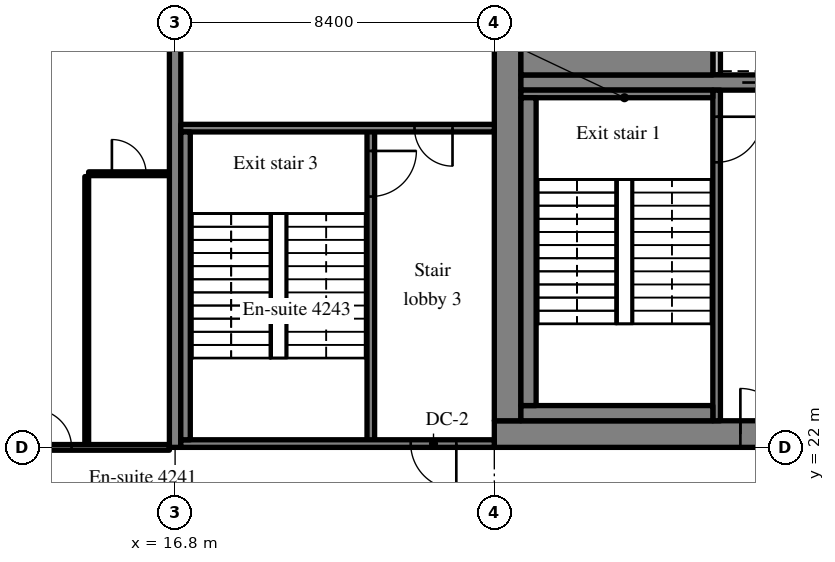
"""IFC4 building model, lengths in metres.
Left out: names, types, materials, properties, quantities, classifications, styles, units other than length and angle.
Written with IfcOpenShell. Run it as: python <this file> out.ifc"""

import sys

from ifc_helpers import new_model, si_unit, direction, frame, frame_2d, origin, place, context, subcontext, project, spatial, rectangle, extrude, source, transform, mapped, element, fill, save


model = new_model("IFC4")
c1 = context("Model", 3, precision=1e-05, world=origin(), true_north=direction((0.0, 1.0)))
c2 = subcontext(c1, "Body", "Model", "MODEL_VIEW")
j1 = project(units=[si_unit("LENGTHUNIT", "METRE"), si_unit("PLANEANGLEUNIT", "RADIAN")], contexts=[c1])
p1 = place(None, origin())
s1 = spatial("IfcSite", under=j1, at=p1, CompositionType="ELEMENT")
p2 = place(p1, origin())
s2 = spatial("IfcBuilding", under=s1, at=p2, CompositionType="ELEMENT")
p3 = place(p2, frame((0.0, 0.0, 174.4)))
s3 = spatial("IfcBuildingStorey", under=s2, at=p3, CompositionType="ELEMENT", Elevation=174.4)
m1 = source(origin(), c2, "Body", "SweptSolid", [
    extrude(rectangle(XDim=50.4, YDim=0.7, at=frame_2d((25.2, 0.0))), origin(), (0.0, 0.0, 1.0), 3.52),
])
p4 = place(p3, frame((25.2, 22.35, 0.0), z_axis=(0.0, 0.0, 1.0), x_axis=(1.0, 0.0, 0.0)))
e1 = element("IfcWall", 1, at=p4, inside=s3, PredefinedType="SHEAR", context=c2, shape_type="MappedRepresentation", body=[
    mapped(m1, transform((0.0, 0.0, 0.0), scale=1.0)),
])
m2 = source(origin(), c2, "Body", "SweptSolid", [
    extrude(rectangle(XDim=1.8, YDim=2.1, at=frame_2d((0.9, 1.05))), frame((0.0, 0.36, 0.0), z_axis=(0.0, -1.0, 0.0), x_axis=(1.0, 0.0, 0.0)), (0.0, 0.0, 1.0), 0.72),
])
p5 = place(p4, frame((15.9, 0.0, 0.0)))
e2 = element("IfcOpeningElement", 2, at=p5, cuts=e1, PredefinedType="OPENING", context=c2, shape_type="MappedRepresentation", body=[
    mapped(m2, transform((0.0, 0.0, 0.0), scale=1.0)),
])
m3 = source(origin(), c2, "Body", "SweptSolid", [
    extrude(rectangle(XDim=0.9, YDim=2.1, at=frame_2d((0.45, 1.05))), frame((0.0, 0.36, 0.0), z_axis=(0.0, -1.0, 0.0), x_axis=(1.0, 0.0, 0.0)), (0.0, 0.0, 1.0), 0.72),
])
p6 = place(p4, frame((11.2, 0.0, 0.0)))
e3 = element("IfcOpeningElement", 3, at=p6, cuts=e1, PredefinedType="OPENING", context=c2, shape_type="MappedRepresentation", body=[
    mapped(m3, transform((0.0, 0.0, 0.0), scale=1.0)),
])
p7 = place(p4, frame((21.5, 0.0, 0.0)))
e4 = element("IfcOpeningElement", 4, at=p7, cuts=e1, PredefinedType="OPENING", context=c2, shape_type="MappedRepresentation", body=[
    mapped(m3, transform((0.0, 0.0, 0.0), scale=1.0)),
])
p8 = place(p4, frame((32.7, 0.0, 0.0)))
e5 = element("IfcOpeningElement", 5, at=p8, cuts=e1, PredefinedType="OPENING", context=c2, shape_type="MappedRepresentation", body=[
    mapped(m2, transform((0.0, 0.0, 0.0), scale=1.0)),
])
m4 = source(origin(), c2, "Body", "SweptSolid", [
    extrude(rectangle(XDim=1.2, YDim=2.1, at=frame_2d((0.6, 1.05))), frame((0.0, 0.36, 0.0), z_axis=(0.0, -1.0, 0.0), x_axis=(1.0, 0.0, 0.0)), (0.0, 0.0, 1.0), 0.72),
])
p9 = place(p4, frame((6.475, 0.0, 0.0)))
e6 = element("IfcOpeningElement", 6, at=p9, cuts=e1, PredefinedType="OPENING", context=c2, shape_type="MappedRepresentation", body=[
    mapped(m4, transform((0.0, 0.0, 0.0), scale=1.0)),
])
p10 = place(p4, frame((47.875, 0.0, 0.0)))
e7 = element("IfcOpeningElement", 7, at=p10, cuts=e1, PredefinedType="OPENING", context=c2, shape_type="MappedRepresentation", body=[
    mapped(m4, transform((0.0, 0.0, 0.0), scale=1.0)),
])
m5 = source(origin(), c2, "Body", "SweptSolid", [
    extrude(rectangle(XDim=18.6, YDim=0.7, at=frame_2d((9.3, 0.0))), origin(), (0.0, 0.0, 1.0), 3.52),
])
p11 = place(p3, frame((25.55, 22.7, 0.0), z_axis=(0.0, 0.0, 1.0), x_axis=(0.0, 1.0, 0.0)))
e8 = element("IfcWall", 8, at=p11, inside=s3, PredefinedType="SHEAR", context=c2, shape_type="MappedRepresentation", body=[
    mapped(m5, transform((0.0, 0.0, 0.0), scale=1.0)),
])
m6 = source(origin(), c2, "Body", "SweptSolid", [
    extrude(rectangle(XDim=7.5, YDim=0.4, at=frame_2d((3.75, 0.0))), origin(), (0.0, 0.0, 1.0), 3.52),
])
p12 = place(p3, frame((25.9, 31.6, 0.0), z_axis=(0.0, 0.0, 1.0), x_axis=(1.0, 0.0, 0.0)))
e9 = element("IfcWall", 9, at=p12, inside=s3, PredefinedType="SHEAR", context=c2, shape_type="MappedRepresentation", body=[
    mapped(m6, transform((0.0, 0.0, 0.0), scale=1.0)),
])
m7 = source(origin(), c2, "Body", "SweptSolid", [
    extrude(rectangle(XDim=1.1, YDim=2.1, at=frame_2d((0.55, 1.05))), frame((0.0, 0.21, 0.0), z_axis=(0.0, -1.0, 0.0), x_axis=(1.0, 0.0, 0.0)), (0.0, 0.0, 1.0), 0.42),
])
p13 = place(p12, frame((5.825, 0.0, 0.0)))
e10 = element("IfcOpeningElement", 10, at=p13, cuts=e9, PredefinedType="OPENING", context=c2, shape_type="MappedRepresentation", body=[
    mapped(m7, transform((0.0, 0.0, 0.0), scale=1.0)),
])
m8 = source(origin(), c2, "Body", "SweptSolid", [
    extrude(rectangle(XDim=20.0, YDim=0.3, at=frame_2d((10.0, 0.0))), origin(), (0.0, 0.0, 1.0), 3.52),
])
p14 = place(p3, frame((16.8, 22.0, 0.0), z_axis=(0.0, 0.0, 1.0), x_axis=(0.0, 1.0, 0.0)))
e11 = element("IfcWall", 11, at=p14, inside=s3, PredefinedType="SHEAR", context=c2, shape_type="MappedRepresentation", body=[
    mapped(m8, transform((0.0, 0.0, 0.0), scale=1.0)),
])
m9 = source(origin(), c2, "Body", "SweptSolid", [
    extrude(rectangle(XDim=8.7, YDim=0.2, at=frame_2d((4.35, 0.0))), origin(), (0.0, 0.0, 1.0), 3.52),
])
p15 = place(p3, frame((31.05, 22.7, 0.0), z_axis=(0.0, 0.0, 1.0), x_axis=(0.0, 1.0, 0.0)))
e12 = element("IfcWall", 12, at=p15, inside=s3, PredefinedType="SOLIDWALL", context=c2, shape_type="MappedRepresentation", body=[
    mapped(m9, transform((0.0, 0.0, 0.0), scale=1.0)),
])
m10 = source(origin(), c2, "Body", "SweptSolid", [
    extrude(rectangle(XDim=1.2, YDim=2.1, at=frame_2d((0.6, 1.05))), frame((0.0, 0.11, 0.0), z_axis=(0.0, -1.0, 0.0), x_axis=(1.0, 0.0, 0.0)), (0.0, 0.0, 1.0), 0.22),
])
p16 = place(p15, frame((6.8, 0.0, 0.0)))
e13 = element("IfcOpeningElement", 13, at=p16, cuts=e12, PredefinedType="OPENING", context=c2, shape_type="MappedRepresentation", body=[
    mapped(m10, transform((0.0, 0.0, 0.0), scale=1.0)),
])
m11 = source(origin(), c2, "Body", "SweptSolid", [
    extrude(rectangle(XDim=1.8, YDim=0.2, at=frame_2d((0.9, 0.0))), origin(), (0.0, 0.0, 1.0), 3.52),
])
p17 = place(p3, frame((31.05, 31.8, 0.0), z_axis=(0.0, 0.0, 1.0), x_axis=(0.0, 1.0, 0.0)))
e14 = element("IfcWall", 14, at=p17, inside=s3, PredefinedType="SOLIDWALL", context=c2, shape_type="MappedRepresentation", body=[
    mapped(m11, transform((0.0, 0.0, 0.0), scale=1.0)),
])
m12 = source(origin(), c2, "Body", "SweptSolid", [
    extrude(rectangle(XDim=8.3, YDim=0.2, at=frame_2d((4.15, 0.0))), origin(), (0.0, 0.0, 1.0), 3.52),
])
p18 = place(p3, frame((21.95, 22.1, 0.0), z_axis=(0.0, 0.0, 1.0), x_axis=(0.0, 1.0, 0.0)))
e15 = element("IfcWall", 15, at=p18, inside=s3, PredefinedType="SOLIDWALL", context=c2, shape_type="MappedRepresentation", body=[
    mapped(m12, transform((0.0, 0.0, 0.0), scale=1.0)),
])
p19 = place(p18, frame((6.5, 0.0, 0.0)))
e16 = element("IfcOpeningElement", 16, at=p19, cuts=e15, PredefinedType="OPENING", context=c2, shape_type="MappedRepresentation", body=[
    mapped(m10, transform((0.0, 0.0, 0.0), scale=1.0)),
])
m13 = source(origin(), c2, "Body", "SweptSolid", [
    extrude(rectangle(XDim=8.25, YDim=0.2, at=frame_2d((4.125, 0.0))), origin(), (0.0, 0.0, 1.0), 3.52),
])
p20 = place(p3, frame((16.95, 22.1, 0.0), z_axis=(0.0, 0.0, 1.0), x_axis=(1.0, 0.0, 0.0)))
e17 = element("IfcWall", 17, at=p20, inside=s3, PredefinedType="SOLIDWALL", context=c2, shape_type="MappedRepresentation", body=[
    mapped(m13, transform((0.0, 0.0, 0.0), scale=1.0)),
])
p21 = place(p20, frame((6.05, 0.0, 0.0)))
e18 = element("IfcOpeningElement", 18, at=p21, cuts=e17, PredefinedType="OPENING", context=c2, shape_type="MappedRepresentation", body=[
    mapped(m10, transform((0.0, 0.0, 0.0), scale=1.0)),
])
p22 = place(p3, frame((16.95, 30.4, 0.0), z_axis=(0.0, 0.0, 1.0), x_axis=(1.0, 0.0, 0.0)))
e19 = element("IfcWall", 19, at=p22, inside=s3, PredefinedType="SOLIDWALL", context=c2, shape_type="MappedRepresentation", body=[
    mapped(m13, transform((0.0, 0.0, 0.0), scale=1.0)),
])
m14 = source(origin(), c2, "Body", "SweptSolid", [
    extrude(rectangle(XDim=1.0, YDim=2.1, at=frame_2d((0.5, 1.05))), frame((0.0, 0.11, 0.0), z_axis=(0.0, -1.0, 0.0), x_axis=(1.0, 0.0, 0.0)), (0.0, 0.0, 1.0), 0.22),
])
p23 = place(p22, frame((6.15, 0.0, 0.0)))
e20 = element("IfcOpeningElement", 20, at=p23, cuts=e19, PredefinedType="OPENING", context=c2, shape_type="MappedRepresentation", body=[
    mapped(m14, transform((0.0, 0.0, 0.0), scale=1.0)),
])
m15 = source(origin(), c2, "Body", "SweptSolid", [
    extrude(rectangle(XDim=5.05, YDim=0.4, at=frame_2d((2.525, 0.0))), origin(), (0.0, 0.0, 1.0), 3.52),
])
p24 = place(p3, frame((25.9, 22.9, 0.0), z_axis=(0.0, 0.0, 1.0), x_axis=(1.0, 0.0, 0.0)))
e21 = element("IfcWall", 21, at=p24, inside=s3, PredefinedType="SOLIDWALL", context=c2, shape_type="MappedRepresentation", body=[
    mapped(m15, transform((0.0, 0.0, 0.0), scale=1.0)),
])
m16 = source(origin(), c2, "Body", "SweptSolid", [
    extrude(rectangle(XDim=5.05, YDim=0.2, at=frame_2d((2.525, 0.0))), origin(), (0.0, 0.0, 1.0), 3.52),
])
p25 = place(p3, frame((25.9, 31.3, 0.0), z_axis=(0.0, 0.0, 1.0), x_axis=(1.0, 0.0, 0.0)))
e22 = element("IfcWall", 22, at=p25, inside=s3, PredefinedType="SOLIDWALL", context=c2, shape_type="MappedRepresentation", body=[
    mapped(m16, transform((0.0, 0.0, 0.0), scale=1.0)),
])
m17 = source(origin(), c2, "Body", "SweptSolid", [
    extrude(rectangle(XDim=8.1, YDim=0.4, at=frame_2d((4.05, 0.0))), origin(), (0.0, 0.0, 1.0), 3.52),
])
p26 = place(p3, frame((26.1, 23.1, 0.0), z_axis=(0.0, 0.0, 1.0), x_axis=(0.0, 1.0, 0.0)))
e23 = element("IfcWall", 23, at=p26, inside=s3, PredefinedType="SOLIDWALL", context=c2, shape_type="MappedRepresentation", body=[
    mapped(m17, transform((0.0, 0.0, 0.0), scale=1.0)),
])
m18 = source(origin(), c2, "Body", "SweptSolid", [
    extrude(rectangle(XDim=8.1, YDim=0.25, at=frame_2d((4.05, 0.0))), origin(), (0.0, 0.0, 1.0), 3.52),
])
p27 = place(p3, frame((17.075, 22.2, 0.0), z_axis=(0.0, 0.0, 1.0), x_axis=(0.0, 1.0, 0.0)))
e24 = element("IfcWall", 24, at=p27, inside=s3, PredefinedType="SOLIDWALL", context=c2, shape_type="MappedRepresentation", body=[
    mapped(m18, transform((0.0, 0.0, 0.0), scale=1.0)),
])
m19 = source(origin(), c2, "Body", "SweptSolid", [
    extrude(rectangle(XDim=5.05, YDim=1.0, at=frame_2d((2.525, 0.0))), origin(), (0.0, 0.0, 1.0), 3.52),
])
p28 = place(p3, frame((25.9, 32.3, 0.0), z_axis=(0.0, 0.0, 1.0), x_axis=(1.0, 0.0, 0.0)))
e25 = element("IfcWall", 25, at=p28, inside=s3, PredefinedType="SOLIDWALL", context=c2, shape_type="MappedRepresentation", body=[
    mapped(m19, transform((0.0, 0.0, 0.0), scale=1.0)),
])
m20 = source(origin(), c2, "Body", "SweptSolid", [
    extrude(rectangle(XDim=7.05, YDim=0.1, at=frame_2d((3.525, 0.0))), origin(), (0.0, 0.0, 1.0), 3.52),
])
p29 = place(p3, frame((14.475, 22.075, 0.0), z_axis=(0.0, 0.0, 1.0), x_axis=(0.0, 1.0, 0.0)))
e26 = element("IfcWall", 26, at=p29, inside=s3, PredefinedType="PARTITIONING", context=c2, shape_type="MappedRepresentation", body=[
    mapped(m20, transform((0.0, 0.0, 0.0), scale=1.0)),
])
m21 = source(origin(), c2, "Body", "SweptSolid", [
    extrude(rectangle(XDim=2.125, YDim=0.1, at=frame_2d((1.062, 0.0))), origin(), (0.0, 0.0, 1.0), 3.52),
])
p30 = place(p3, frame((14.525, 29.2, 0.0), z_axis=(0.0, 0.0, 1.0), x_axis=(1.0, 0.0, 0.0)))
e27 = element("IfcWall", 27, at=p30, inside=s3, PredefinedType="PARTITIONING", context=c2, shape_type="MappedRepresentation", body=[
    mapped(m21, transform((0.0, 0.0, 0.0), scale=1.0)),
])
m22 = source(origin(), c2, "Body", "SweptSolid", [
    extrude(rectangle(XDim=0.9, YDim=2.1, at=frame_2d((0.45, 1.05))), frame((0.0, 0.06, 0.0), z_axis=(0.0, -1.0, 0.0), x_axis=(1.0, 0.0, 0.0)), (0.0, 0.0, 1.0), 0.12),
])
p31 = place(p30, frame((0.612, 0.0, 0.0)))
e28 = element("IfcOpeningElement", 28, at=p31, cuts=e27, PredefinedType="OPENING", context=c2, shape_type="MappedRepresentation", body=[
    mapped(m22, transform((0.0, 0.0, 0.0), scale=1.0)),
])
m23 = source(origin(), c2, "Body", "SweptSolid", [
    extrude(rectangle(XDim=3.975, YDim=0.15, at=frame_2d((1.987, 0.0))), origin(), (0.0, 0.0, 1.0), 2.82),
])
p32 = place(p3, frame((12.675, 22.0, 0.0), z_axis=(0.0, 0.0, 1.0), x_axis=(1.0, 0.0, 0.0)))
e29 = element("IfcWall", 29, at=p32, inside=s3, PredefinedType="PARTITIONING", context=c2, shape_type="MappedRepresentation", body=[
    mapped(m23, transform((0.0, 0.0, 0.0), scale=1.0)),
])
m24 = source(origin(), c2, "Body", "SweptSolid", [
    extrude(rectangle(XDim=1.0, YDim=2.1, at=frame_2d((0.5, 1.05))), frame((0.0, 0.085, 0.0), z_axis=(0.0, -1.0, 0.0), x_axis=(1.0, 0.0, 0.0)), (0.0, 0.0, 1.0), 0.17),
])
p33 = place(p32, frame((0.4, 0.0, 0.0)))
e30 = element("IfcOpeningElement", 30, at=p33, cuts=e29, PredefinedType="OPENING", context=c2, shape_type="MappedRepresentation", body=[
    mapped(m24, transform((0.0, 0.0, 0.0), scale=1.0)),
])
m25 = source(origin(), c2, "Body", "SweptSolid", [
    extrude(rectangle(XDim=1.2, YDim=2.1, at=frame_2d((0.6, 1.05))), frame((0.0, 0.025, 0.0), z_axis=(0.0, -1.0, 0.0), x_axis=(1.0, 0.0, 0.0)), (0.0, 0.0, 1.0), 0.05),
])
p34 = place(p16, origin())
e31 = element("IfcDoor", 31, at=p34, inside=s3, OperationType="SINGLE_SWING_RIGHT", PredefinedType="DOOR", context=c2, shape_type="MappedRepresentation", body=[
    mapped(m25, transform((0.0, 0.0, 0.0), scale=1.0)),
])
fill(e13, e31)
m26 = source(origin(), c2, "Body", "SweptSolid", [
    extrude(rectangle(XDim=1.2, YDim=2.1, at=frame_2d((0.6, 1.05))), frame((0.0, 0.275, 0.0), z_axis=(0.0, -1.0, 0.0), x_axis=(1.0, 0.0, 0.0)), (0.0, 0.0, 1.0), 0.05),
])
p35 = place(p9, origin())
e32 = element("IfcDoor", 32, at=p35, inside=s3, OperationType="SINGLE_SWING_LEFT", PredefinedType="DOOR", context=c2, shape_type="MappedRepresentation", body=[
    mapped(m26, transform((0.0, 0.0, 0.0), scale=1.0)),
])
fill(e6, e32)
m27 = source(origin(), c2, "Body", "SweptSolid", [
    extrude(rectangle(XDim=1.1, YDim=2.1, at=frame_2d((0.55, 1.05))), frame((0.0, 0.025, 0.0), z_axis=(0.0, -1.0, 0.0), x_axis=(1.0, 0.0, 0.0)), (0.0, 0.0, 1.0), 0.05),
])
p36 = place(p13, origin())
e33 = element("IfcDoor", 33, at=p36, inside=s3, OperationType="SLIDING_TO_LEFT", PredefinedType="DOOR", context=c2, shape_type="MappedRepresentation", body=[
    mapped(m27, transform((0.0, 0.0, 0.0), scale=1.0)),
])
fill(e10, e33)
p37 = place(p19, origin())
e34 = element("IfcDoor", 34, at=p37, inside=s3, OperationType="SINGLE_SWING_RIGHT", PredefinedType="DOOR", context=c2, shape_type="MappedRepresentation", body=[
    mapped(m25, transform((0.0, 0.0, 0.0), scale=1.0)),
])
fill(e16, e34)
p38 = place(p21, origin())
e35 = element("IfcDoor", 35, at=p38, inside=s3, OperationType="SINGLE_SWING_RIGHT", PredefinedType="DOOR", context=c2, shape_type="MappedRepresentation", body=[
    mapped(m25, transform((0.0, 0.0, 0.0), scale=1.0)),
])
fill(e18, e35)
m28 = source(origin(), c2, "Body", "SweptSolid", [
    extrude(rectangle(XDim=1.0, YDim=2.1, at=frame_2d((0.5, 1.05))), frame((0.0, 0.025, 0.0), z_axis=(0.0, -1.0, 0.0), x_axis=(1.0, 0.0, 0.0)), (0.0, 0.0, 1.0), 0.05),
])
p39 = place(p23, origin())
e36 = element("IfcDoor", 36, at=p39, inside=s3, OperationType="SINGLE_SWING_RIGHT", PredefinedType="DOOR", context=c2, shape_type="MappedRepresentation", body=[
    mapped(m28, transform((0.0, 0.0, 0.0), scale=1.0)),
])
fill(e20, e36)
m29 = source(origin(), c2, "Body", "SweptSolid", [
    extrude(rectangle(XDim=0.9, YDim=2.1, at=frame_2d((0.45, 1.05))), frame((0.0, 0.025, 0.0), z_axis=(0.0, -1.0, 0.0), x_axis=(1.0, 0.0, 0.0)), (0.0, 0.0, 1.0), 0.05),
])
p40 = place(p31, origin())
e37 = element("IfcDoor", 37, at=p40, inside=s3, OperationType="SINGLE_SWING_LEFT", PredefinedType="DOOR", context=c2, shape_type="MappedRepresentation", body=[
    mapped(m29, transform((0.0, 0.0, 0.0), scale=1.0)),
])
fill(e28, e37)
p41 = place(p33, origin())
e38 = element("IfcDoor", 38, at=p41, inside=s3, OperationType="SINGLE_SWING_LEFT", PredefinedType="DOOR", context=c2, shape_type="MappedRepresentation", body=[
    mapped(m28, transform((0.0, 0.0, 0.0), scale=1.0)),
])
fill(e30, e38)
save(model, sys.argv[1])
